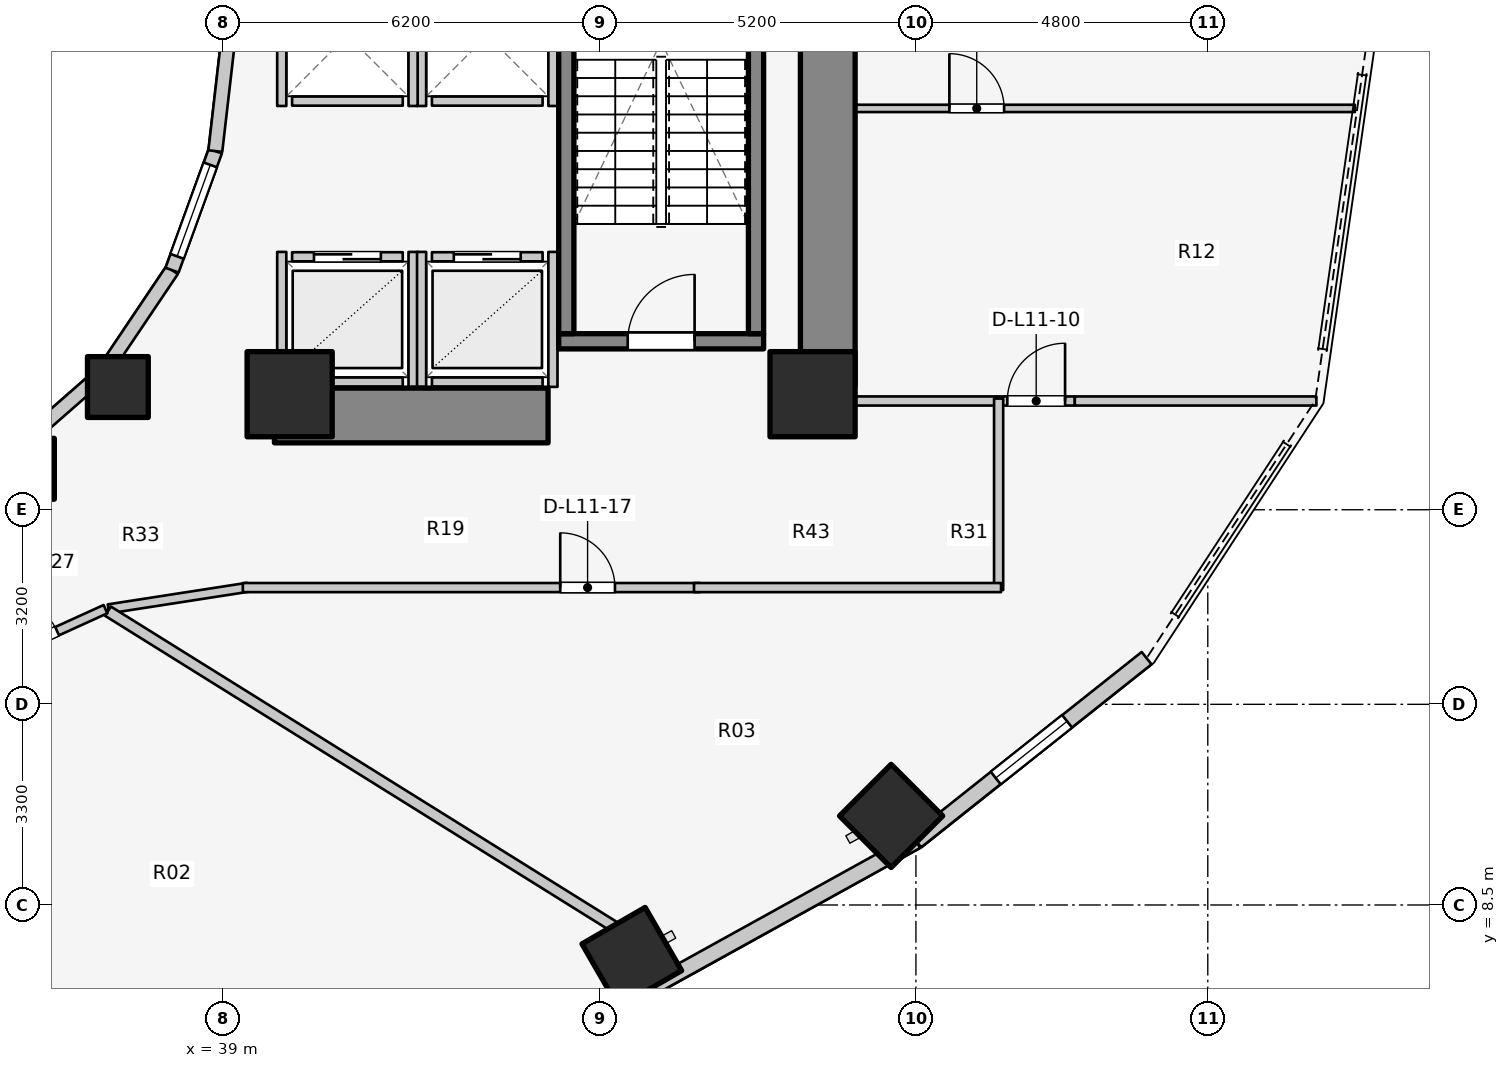
"""IFC4 building model, lengths in metres.
Left out: names, types, materials, properties, quantities, classifications, styles, units other than length and angle.
Written with IfcOpenShell. Run it as: python <this file> out.ifc"""

import sys

from ifc_helpers import new_model, si_unit, direction, frame, frame_2d, origin, origin_2d, place, context, subcontext, project, spatial, rectangle, extrude, element, fill, save


model = new_model("IFC4")
c1 = context("Model", 3, precision=1e-05, world=origin(), true_north=direction((0.0, 1.0)))
c2 = subcontext(c1, "Body", "Model", "MODEL_VIEW")
j1 = project(units=[si_unit("LENGTHUNIT", "METRE"), si_unit("PLANEANGLEUNIT", "RADIAN")], contexts=[c1])
p1 = place(None, origin())
s1 = spatial("IfcSite", under=j1, at=p1, CompositionType="ELEMENT")
p2 = place(p1, origin())
s2 = spatial("IfcBuilding", under=s1, at=p2, CompositionType="ELEMENT")
p3 = place(p2, frame((0.0, 0.0, 40.0)))
s3 = spatial("IfcBuildingStorey", under=s2, at=p3, CompositionType="ELEMENT", Elevation=40.0)
p4 = place(p3, frame((48.95, 17.05, 0.0), z_axis=(0.0, 0.0, 1.0), x_axis=(0.0, 1.0, 0.0)))
e1 = element("IfcWall", 1, at=p4, inside=s3, PredefinedType="SHEAR", context=c2, shape_type="SweptSolid", body=[
    extrude(rectangle(XDim=12.8, YDim=0.9, at=frame_2d((6.4, 0.0))), origin(), (0.0, 0.0, 1.0), 3.1),
])
p5 = place(p3, frame((39.85, 16.55, 0.0), z_axis=(0.0, 0.0, 1.0), x_axis=(1.0, 0.0, 0.0)))
e2 = element("IfcWall", 2, at=p5, inside=s3, PredefinedType="SHEAR", context=c2, shape_type="SweptSolid", body=[
    extrude(rectangle(XDim=4.5, YDim=0.9, at=frame_2d((2.25, 0.0))), origin(), (0.0, 0.0, 1.0), 3.1),
])
p6 = place(p3, frame((44.525, 17.77, 0.0), z_axis=(0.0, 0.0, 1.0), x_axis=(1.0, 0.0, 0.0)))
e3 = element("IfcWall", 3, at=p6, inside=s3, PredefinedType="SOLIDWALL", context=c2, shape_type="SweptSolid", body=[
    extrude(rectangle(XDim=3.37, YDim=0.25, at=frame_2d((1.685, 0.0))), origin(), (0.0, 0.0, 1.0), 3.1),
])
p7 = place(p6, frame((1.135, 0.0, 0.0)))
e4 = element("IfcOpeningElement", 4, at=p7, cuts=e3, PredefinedType="OPENING", context=c2, shape_type="SweptSolid", body=[
    extrude(rectangle(XDim=1.1, YDim=2.1, at=frame_2d((0.55, 1.05))), frame((0.0, 0.135, 0.0), z_axis=(0.0, -1.0, 0.0), x_axis=(1.0, 0.0, 0.0)), (0.0, 0.0, 1.0), 0.27),
])
for number, where, z_axis, x_axis in (
    (5, (44.65, 17.895, 0.0), (0.0, 0.0, 1.0), (0.0, 1.0, 0.0)),
    (6, (47.77, 17.895, 0.0), (0.0, 0.0, 1.0), (0.0, 1.0, 0.0)),
):
    element("IfcWall", number, at=place(p3, frame(where, z_axis=z_axis, x_axis=x_axis)), inside=s3, PredefinedType="SOLIDWALL", context=c2, shape_type="SweptSolid", body=[
        extrude(rectangle(XDim=7.81, YDim=0.25, at=frame_2d((3.905, 0.0))), origin(), (0.0, 0.0, 1.0), 3.1),
    ])
for number, where, z_axis, x_axis in (
    (7, (40.1, 16.9, 0.0), (0.0, 0.0, 1.0), (1.0, 0.0, 0.0)),
    (8, (48.7, 16.9, 0.0), (0.0, 0.0, 1.0), (1.0, 0.0, 0.0)),
):
    element("IfcColumn", number, at=place(p3, frame(where, z_axis=z_axis, x_axis=x_axis)), inside=s3, PredefinedType="COLUMN", context=c2, shape_type="SweptSolid", body=[
        extrude(rectangle(XDim=1.4, YDim=1.4, at=origin_2d()), origin(), (0.0, 0.0, 1.0), 3.1),
    ])
p8 = place(p3, frame((35.73, 15.673, 0.0), z_axis=(0.0, 0.0, 1.0), x_axis=(1.0, 0.0, 0.0)))
e9 = element("IfcColumn", 9, at=p8, inside=s3, PredefinedType="COLUMN", context=c2, shape_type="SweptSolid", body=[
    extrude(rectangle(XDim=1.0, YDim=1.0, at=origin_2d()), origin(), (0.0, 0.0, 1.0), 3.1),
])
p9 = place(p3, frame((45.727, 7.641, 0.0), z_axis=(0.0, 0.0, 1.0), x_axis=(0.5, -0.866025403784, 0.0)))
e10 = element("IfcColumn", 10, at=p9, inside=s3, PredefinedType="COLUMN", context=c2, shape_type="SweptSolid", body=[
    extrude(rectangle(XDim=1.2, YDim=1.2, at=origin_2d()), origin(), (0.0, 0.0, 1.0), 3.1),
])
p10 = place(p3, frame((37.275, 17.018, 0.0), z_axis=(0.0, 0.0, 1.0), x_axis=(1.0, 0.0, 0.0)))
e11 = element("IfcColumn", 11, at=p10, inside=s3, PredefinedType="COLUMN", context=c2, shape_type="SweptSolid", body=[
    extrude(rectangle(XDim=1.0, YDim=1.0, at=origin_2d()), origin(), (0.0, 0.0, 1.0), 3.1),
])
p11 = place(p3, frame((49.992, 9.965, 0.0), z_axis=(0.0, 0.0, 1.0), x_axis=(0.707106781187, -0.707106781187, 0.0)))
e12 = element("IfcColumn", 12, at=p11, inside=s3, PredefinedType="COLUMN", context=c2, shape_type="SweptSolid", body=[
    extrude(rectangle(XDim=1.2, YDim=1.2, at=origin_2d()), origin(), (0.0, 0.0, 1.0), 3.1),
])
p12 = place(p3, frame((35.56, 15.968, 0.0), z_axis=(0.0, 0.0, 1.0), x_axis=(0.752576694707, 0.658504607869, 0.0)))
e13 = element("IfcWall", 13, at=p12, inside=s3, PredefinedType="STANDARD", context=c2, shape_type="SweptSolid", body=[
    extrude(rectangle(XDim=1.959, YDim=0.23, at=frame_2d((0.98, 0.0))), origin(), (0.0, 0.0, 1.0), 2.16),
])
p13 = place(p3, frame((37.035, 17.258, 0.0), z_axis=(0.0, 0.0, 1.0), x_axis=(0.558197800898, 0.829707909492, 0.0)))
e14 = element("IfcWall", 14, at=p13, inside=s3, PredefinedType="STANDARD", context=c2, shape_type="SweptSolid", body=[
    extrude(rectangle(XDim=2.027, YDim=0.23, at=frame_2d((1.013, 0.0))), origin(), (0.0, 0.0, 1.0), 2.16),
])
p14 = place(p3, frame((38.166, 18.94, 0.0), z_axis=(0.0, 0.0, 1.0), x_axis=(0.341423187295, 0.93990968033, 0.0)))
e15 = element("IfcWall", 15, at=p14, inside=s3, PredefinedType="STANDARD", context=c2, shape_type="SweptSolid", body=[
    extrude(rectangle(XDim=2.084, YDim=0.23, at=frame_2d((1.042, 0.0))), origin(), (0.0, 0.0, 1.0), 2.84),
])
p15 = place(p14, frame((0.242, 0.0, 0.85)))
e16 = element("IfcOpeningElement", 16, at=p15, cuts=e15, PredefinedType="OPENING", context=c2, shape_type="SweptSolid", body=[
    extrude(rectangle(XDim=1.6, YDim=1.65, at=frame_2d((0.8, 0.825))), frame((0.0, 0.125, 0.0), z_axis=(0.0, -1.0, 0.0), x_axis=(1.0, 0.0, 0.0)), (0.0, 0.0, 1.0), 0.25),
])
p16 = place(p3, frame((38.877, 20.898, 0.0), z_axis=(0.0, 0.0, 1.0), x_axis=(0.114711713601, 0.993398823617, 0.0)))
e17 = element("IfcWall", 17, at=p16, inside=s3, PredefinedType="STANDARD", context=c2, shape_type="SweptSolid", body=[
    extrude(rectangle(XDim=2.115, YDim=0.23, at=frame_2d((1.058, 0.0))), origin(), (0.0, 0.0, 1.0), 2.84),
])
p17 = place(p3, frame((40.332, 5.447, 0.0), z_axis=(0.0, 0.0, 1.0), x_axis=(0.958843593522, 0.283934786811, 0.0)))
e18 = element("IfcWall", 18, at=p17, inside=s3, PredefinedType="STANDARD", context=c2, shape_type="SweptSolid", body=[
    extrude(rectangle(XDim=5.955, YDim=0.26, at=frame_2d((2.978, 0.0))), origin(), (0.0, 0.0, 1.0), 2.85),
])
p18 = place(p17, frame((1.778, 0.0, 0.75)))
e19 = element("IfcOpeningElement", 19, at=p18, cuts=e18, PredefinedType="OPENING", context=c2, shape_type="SweptSolid", body=[
    extrude(rectangle(XDim=2.4, YDim=1.7, at=frame_2d((1.2, 0.85))), frame((0.0, 0.14, 0.0), z_axis=(0.0, -1.0, 0.0), x_axis=(1.0, 0.0, 0.0)), (0.0, 0.0, 1.0), 0.28),
])
p19 = place(p3, frame((46.042, 7.138, 0.0), z_axis=(0.0, 0.0, 1.0), x_axis=(0.875137303239, 0.483874674352, 0.0)))
e20 = element("IfcWall", 20, at=p19, inside=s3, PredefinedType="STANDARD", context=c2, shape_type="SweptSolid", body=[
    extrude(rectangle(XDim=4.985, YDim=0.26, at=frame_2d((2.493, 0.0))), origin(), (0.0, 0.0, 1.0), 2.85),
])
p20 = place(p3, frame((50.405, 9.55, 0.0), z_axis=(0.0, 0.0, 1.0), x_axis=(0.783123133379, 0.621866672179, 0.0)))
e21 = element("IfcWall", 21, at=p20, inside=s3, PredefinedType="STANDARD", context=c2, shape_type="SweptSolid", body=[
    extrude(rectangle(XDim=4.839, YDim=0.26, at=frame_2d((2.419, 0.0))), origin(), (0.0, 0.0, 1.0), 2.85),
])
p21 = place(p20, frame((1.669, 0.0, 0.75)))
e22 = element("IfcOpeningElement", 22, at=p21, cuts=e21, PredefinedType="OPENING", context=c2, shape_type="SweptSolid", body=[
    extrude(rectangle(XDim=1.5, YDim=1.6, at=frame_2d((0.75, 0.8))), frame((0.0, 0.14, 0.0), z_axis=(0.0, -1.0, 0.0), x_axis=(1.0, 0.0, 0.0)), (0.0, 0.0, 1.0), 0.28),
])
p22 = place(p3, frame((40.14, 19.16, 0.0), z_axis=(0.0, 0.0, 1.0), x_axis=(1.0, 0.0, 0.0)))
e23 = element("IfcWall", 23, at=p22, inside=s3, PredefinedType="SOLIDWALL", context=c2, shape_type="SweptSolid", body=[
    extrude(rectangle(XDim=1.82, YDim=0.15, at=frame_2d((0.91, 0.0))), origin(), (0.0, 0.0, 1.0), 2.12),
])
p23 = place(p22, frame((0.36, 0.0, 0.0)))
e24 = element("IfcOpeningElement", 24, at=p23, cuts=e23, PredefinedType="OPENING", context=c2, shape_type="SweptSolid", body=[
    extrude(rectangle(XDim=1.1, YDim=2.1, at=frame_2d((0.55, 1.05))), frame((0.0, 0.085, 0.0), z_axis=(0.0, -1.0, 0.0), x_axis=(1.0, 0.0, 0.0)), (0.0, 0.0, 1.0), 0.17),
])
p24 = place(p3, frame((40.14, 17.1, 0.0), z_axis=(0.0, 0.0, 1.0), x_axis=(1.0, 0.0, 0.0)))
e25 = element("IfcWall", 25, at=p24, inside=s3, PredefinedType="SOLIDWALL", context=c2, shape_type="SweptSolid", body=[
    extrude(rectangle(XDim=1.82, YDim=0.15, at=frame_2d((0.91, 0.0))), origin(), (0.0, 0.0, 1.0), 2.12),
])
p25 = place(p3, frame((39.97, 17.02, 0.0), z_axis=(0.0, 0.0, 1.0), x_axis=(0.0, 1.0, 0.0)))
e26 = element("IfcWall", 26, at=p25, inside=s3, PredefinedType="SOLIDWALL", context=c2, shape_type="SweptSolid", body=[
    extrude(rectangle(XDim=2.22, YDim=0.15, at=frame_2d((1.11, 0.0))), origin(), (0.0, 0.0, 1.0), 2.12),
])
p26 = place(p3, frame((42.13, 17.02, 0.0), z_axis=(0.0, 0.0, 1.0), x_axis=(0.0, 1.0, 0.0)))
e27 = element("IfcWall", 27, at=p26, inside=s3, PredefinedType="SOLIDWALL", context=c2, shape_type="SweptSolid", body=[
    extrude(rectangle(XDim=2.22, YDim=0.15, at=frame_2d((1.11, 0.0))), origin(), (0.0, 0.0, 1.0), 2.855),
])
p27 = place(p3, frame((42.44, 19.16, 0.0), z_axis=(0.0, 0.0, 1.0), x_axis=(1.0, 0.0, 0.0)))
e28 = element("IfcWall", 28, at=p27, inside=s3, PredefinedType="SOLIDWALL", context=c2, shape_type="SweptSolid", body=[
    extrude(rectangle(XDim=1.82, YDim=0.15, at=frame_2d((0.91, 0.0))), origin(), (0.0, 0.0, 1.0), 2.855),
])
p28 = place(p27, frame((0.36, 0.0, 0.0)))
e29 = element("IfcOpeningElement", 29, at=p28, cuts=e28, PredefinedType="OPENING", context=c2, shape_type="SweptSolid", body=[
    extrude(rectangle(XDim=1.1, YDim=2.1, at=frame_2d((0.55, 1.05))), frame((0.0, 0.085, 0.0), z_axis=(0.0, -1.0, 0.0), x_axis=(1.0, 0.0, 0.0)), (0.0, 0.0, 1.0), 0.17),
])
p29 = place(p3, frame((42.44, 17.1, 0.0), z_axis=(0.0, 0.0, 1.0), x_axis=(1.0, 0.0, 0.0)))
e30 = element("IfcWall", 30, at=p29, inside=s3, PredefinedType="SOLIDWALL", context=c2, shape_type="SweptSolid", body=[
    extrude(rectangle(XDim=1.82, YDim=0.15, at=frame_2d((0.91, 0.0))), origin(), (0.0, 0.0, 1.0), 2.855),
])
p30 = place(p3, frame((42.27, 17.02, 0.0), z_axis=(0.0, 0.0, 1.0), x_axis=(0.0, 1.0, 0.0)))
e31 = element("IfcWall", 31, at=p30, inside=s3, PredefinedType="SOLIDWALL", context=c2, shape_type="SweptSolid", body=[
    extrude(rectangle(XDim=2.22, YDim=0.15, at=frame_2d((1.11, 0.0))), origin(), (0.0, 0.0, 1.0), 2.855),
])
p31 = place(p3, frame((44.43, 17.02, 0.0), z_axis=(0.0, 0.0, 1.0), x_axis=(0.0, 1.0, 0.0)))
e32 = element("IfcWall", 32, at=p31, inside=s3, PredefinedType="SOLIDWALL", context=c2, shape_type="SweptSolid", body=[
    extrude(rectangle(XDim=2.22, YDim=0.15, at=frame_2d((1.11, 0.0))), origin(), (0.0, 0.0, 1.0), 2.12),
])
p32 = place(p3, frame((42.44, 21.72, 0.0), z_axis=(0.0, 0.0, 1.0), x_axis=(1.0, 0.0, 0.0)))
e33 = element("IfcWall", 33, at=p32, inside=s3, PredefinedType="SOLIDWALL", context=c2, shape_type="SweptSolid", body=[
    extrude(rectangle(XDim=1.82, YDim=0.15, at=frame_2d((0.91, 0.0))), origin(), (0.0, 0.0, 1.0), 2.855),
])
for number, where, z_axis, x_axis in (
    (34, (42.27, 21.64, 0.0), (0.0, 0.0, 1.0), (0.0, 1.0, 0.0)),
    (35, (44.43, 21.64, 0.0), (0.0, 0.0, 1.0), (0.0, 1.0, 0.0)),
):
    element("IfcWall", number, at=place(p3, frame(where, z_axis=z_axis, x_axis=x_axis)), inside=s3, PredefinedType="SOLIDWALL", context=c2, shape_type="SweptSolid", body=[
        extrude(rectangle(XDim=2.32, YDim=0.15, at=frame_2d((1.16, 0.0))), origin(), (0.0, 0.0, 1.0), 2.855),
    ])
p33 = place(p3, frame((40.14, 21.72, 0.0), z_axis=(0.0, 0.0, 1.0), x_axis=(1.0, 0.0, 0.0)))
e36 = element("IfcWall", 36, at=p33, inside=s3, PredefinedType="SOLIDWALL", context=c2, shape_type="SweptSolid", body=[
    extrude(rectangle(XDim=1.82, YDim=0.15, at=frame_2d((0.91, 0.0))), origin(), (0.0, 0.0, 1.0), 2.12),
])
p34 = place(p3, frame((39.97, 21.64, 0.0), z_axis=(0.0, 0.0, 1.0), x_axis=(0.0, 1.0, 0.0)))
e37 = element("IfcWall", 37, at=p34, inside=s3, PredefinedType="SOLIDWALL", context=c2, shape_type="SweptSolid", body=[
    extrude(rectangle(XDim=2.32, YDim=0.15, at=frame_2d((1.16, 0.0))), origin(), (0.0, 0.0, 1.0), 2.12),
])
p35 = place(p3, frame((42.13, 21.64, 0.0), z_axis=(0.0, 0.0, 1.0), x_axis=(0.0, 1.0, 0.0)))
e38 = element("IfcWall", 38, at=p35, inside=s3, PredefinedType="SOLIDWALL", context=c2, shape_type="SweptSolid", body=[
    extrude(rectangle(XDim=2.32, YDim=0.15, at=frame_2d((1.16, 0.0))), origin(), (0.0, 0.0, 1.0), 2.855),
])
p36 = place(p3, frame((48.95, 16.788, 0.0), z_axis=(0.0, 0.0, 1.0), x_axis=(1.0, 0.0, 0.0)))
e39 = element("IfcWall", 39, at=p36, inside=s3, PredefinedType="PARTITIONING", context=c2, shape_type="SweptSolid", body=[
    extrude(rectangle(XDim=2.793, YDim=0.15, at=frame_2d((1.396, 0.0))), origin(), (0.0, 0.0, 1.0), 2.069),
])
p37 = place(p3, frame((51.743, 16.788, 0.0), z_axis=(0.0, 0.0, 1.0), x_axis=(1.0, 0.0, 0.0)))
e40 = element("IfcWall", 40, at=p37, inside=s3, PredefinedType="PARTITIONING", context=c2, shape_type="SweptSolid", body=[
    extrude(rectangle(XDim=1.27, YDim=0.15, at=frame_2d((0.635, 0.0))), origin(), (0.0, 0.0, 1.0), 2.855),
])
p38 = place(p37, frame((0.16, 0.0, 0.0)))
e41 = element("IfcOpeningElement", 41, at=p38, cuts=e40, PredefinedType="OPENING", context=c2, shape_type="SweptSolid", body=[
    extrude(rectangle(XDim=0.95, YDim=2.1, at=frame_2d((0.475, 1.05))), frame((0.0, 0.085, 0.0), z_axis=(0.0, -1.0, 0.0), x_axis=(1.0, 0.0, 0.0)), (0.0, 0.0, 1.0), 0.17),
])
p39 = place(p3, frame((53.013, 16.788, 0.0), z_axis=(0.0, 0.0, 1.0), x_axis=(1.0, 0.0, 0.0)))
e42 = element("IfcWall", 42, at=p39, inside=s3, PredefinedType="PARTITIONING", context=c2, shape_type="SweptSolid", body=[
    extrude(rectangle(XDim=3.973, YDim=0.15, at=frame_2d((1.987, 0.0))), origin(), (0.0, 0.0, 1.0), 2.855),
])
p40 = place(p3, frame((48.95, 21.6, 0.0), z_axis=(0.0, 0.0, 1.0), x_axis=(1.0, 0.0, 0.0)))
e43 = element("IfcWall", 43, at=p40, inside=s3, PredefinedType="MOVABLE", context=c2, shape_type="SweptSolid", body=[
    extrude(rectangle(XDim=8.669, YDim=0.12, at=frame_2d((4.334, 0.0))), origin(), (0.0, 0.0, 1.0), 2.855),
])
p41 = place(p40, frame((2.0, 0.0, 0.0)))
e44 = element("IfcOpeningElement", 44, at=p41, cuts=e43, PredefinedType="OPENING", context=c2, shape_type="SweptSolid", body=[
    extrude(rectangle(XDim=0.9, YDim=2.1, at=frame_2d((0.45, 1.05))), frame((0.0, 0.07, 0.0), z_axis=(0.0, -1.0, 0.0), x_axis=(1.0, 0.0, 0.0)), (0.0, 0.0, 1.0), 0.14),
])
p42 = place(p3, frame((51.76, 13.68, 0.0), z_axis=(0.0, 0.0, 1.0), x_axis=(0.0, 1.0, 0.0)))
e45 = element("IfcWall", 45, at=p42, inside=s3, PredefinedType="PARTITIONING", context=c2, shape_type="SweptSolid", body=[
    extrude(rectangle(XDim=3.148, YDim=0.15, at=frame_2d((1.574, 0.0))), origin(), (0.0, 0.0, 1.0), 2.855),
])
p43 = place(p3, frame((37.119, 13.369, 0.0), z_axis=(0.0, 0.0, 1.0), x_axis=(0.988184633586, 0.153268163508, 0.0)))
e46 = element("IfcWall", 46, at=p43, inside=s3, PredefinedType="PARTITIONING", context=c2, shape_type="SweptSolid", body=[
    extrude(rectangle(XDim=2.318, YDim=0.15, at=frame_2d((1.159, 0.0))), origin(), (0.0, 0.0, 1.0), 2.237),
])
p44 = place(p3, frame((39.33, 13.72, 0.0), z_axis=(0.0, 0.0, 1.0), x_axis=(1.0, 0.0, 0.0)))
e47 = element("IfcWall", 47, at=p44, inside=s3, PredefinedType="PARTITIONING", context=c2, shape_type="SweptSolid", body=[
    extrude(rectangle(XDim=7.52, YDim=0.15, at=frame_2d((3.76, 0.0))), origin(), (0.0, 0.0, 1.0), 2.237),
])
p45 = place(p44, frame((5.22, 0.0, 0.0)))
e48 = element("IfcOpeningElement", 48, at=p45, cuts=e47, PredefinedType="OPENING", context=c2, shape_type="SweptSolid", body=[
    extrude(rectangle(XDim=0.9, YDim=2.1, at=frame_2d((0.45, 1.05))), frame((0.0, 0.085, 0.0), z_axis=(0.0, -1.0, 0.0), x_axis=(1.0, 0.0, 0.0)), (0.0, 0.0, 1.0), 0.17),
])
p46 = place(p3, frame((46.75, 13.72, 0.0), z_axis=(0.0, 0.0, 1.0), x_axis=(1.0, 0.0, 0.0)))
e49 = element("IfcWall", 49, at=p46, inside=s3, PredefinedType="PARTITIONING", context=c2, shape_type="SweptSolid", body=[
    extrude(rectangle(XDim=5.05, YDim=0.15, at=frame_2d((2.525, 0.0))), origin(), (0.0, 0.0, 1.0), 2.069),
])
p47 = place(p3, frame((37.112, 13.332, 0.0), z_axis=(0.0, 0.0, 1.0), x_axis=(0.848647785721, -0.52895834977, 0.0)))
e50 = element("IfcWall", 50, at=p47, inside=s3, PredefinedType="PARTITIONING", context=c2, shape_type="SweptSolid", body=[
    extrude(rectangle(XDim=9.81, YDim=0.18, at=frame_2d((4.905, 0.0))), origin(), (0.0, 0.0, 1.0), 2.237),
])
p48 = place(p3, frame((34.615, 12.247, 0.0), z_axis=(0.0, 0.0, 1.0), x_axis=(0.910186679378, 0.414198272186, 0.0)))
e51 = element("IfcWall", 51, at=p48, inside=s3, PredefinedType="PARTITIONING", context=c2, shape_type="SweptSolid", body=[
    extrude(rectangle(XDim=2.698, YDim=0.15, at=frame_2d((1.349, 0.0))), origin(), (0.0, 0.0, 1.0), 2.237),
])
p49 = place(p48, frame((0.874, 0.0, 0.0)))
e52 = element("IfcOpeningElement", 52, at=p49, cuts=e51, PredefinedType="OPENING", context=c2, shape_type="SweptSolid", body=[
    extrude(rectangle(XDim=0.95, YDim=2.1, at=frame_2d((0.475, 1.05))), frame((0.0, 0.085, 0.0), z_axis=(0.0, -1.0, 0.0), x_axis=(1.0, 0.0, 0.0)), (0.0, 0.0, 1.0), 0.17),
])
p50 = place(p15, origin())
e53 = element("IfcWindow", 53, at=p50, inside=s3, PartitioningType="SINGLE_PANEL", PredefinedType="WINDOW", context=c2, shape_type="SweptSolid", body=[
    extrude(rectangle(XDim=1.6, YDim=1.65, at=frame_2d((0.8, 0.825))), frame((0.0, 0.03, 0.0), z_axis=(0.0, -1.0, 0.0), x_axis=(1.0, 0.0, 0.0)), (0.0, 0.0, 1.0), 0.06),
])
fill(e16, e53)
p51 = place(p21, origin())
e54 = element("IfcWindow", 54, at=p51, inside=s3, PartitioningType="SINGLE_PANEL", PredefinedType="WINDOW", context=c2, shape_type="SweptSolid", body=[
    extrude(rectangle(XDim=1.5, YDim=1.6, at=frame_2d((0.75, 0.8))), frame((0.0, 0.03, 0.0), z_axis=(0.0, -1.0, 0.0), x_axis=(1.0, 0.0, 0.0)), (0.0, 0.0, 1.0), 0.06),
])
fill(e22, e54)
p52 = place(p7, origin())
e55 = element("IfcDoor", 55, at=p52, inside=s3, OperationType="SINGLE_SWING_RIGHT", PredefinedType="DOOR", context=c2, shape_type="SweptSolid", body=[
    extrude(rectangle(XDim=1.1, YDim=2.1, at=frame_2d((0.55, 1.05))), frame((0.0, 0.025, 0.0), z_axis=(0.0, -1.0, 0.0), x_axis=(1.0, 0.0, 0.0)), (0.0, 0.0, 1.0), 0.05),
])
fill(e4, e55)
p53 = place(p23, origin())
e56 = element("IfcDoor", 56, at=p53, inside=s3, OperationType="DOUBLE_DOOR_SLIDING", PredefinedType="DOOR", context=c2, shape_type="SweptSolid", body=[
    extrude(rectangle(XDim=1.1, YDim=2.1, at=frame_2d((0.55, 1.05))), frame((0.0, 0.025, 0.0), z_axis=(0.0, -1.0, 0.0), x_axis=(1.0, 0.0, 0.0)), (0.0, 0.0, 1.0), 0.05),
])
fill(e24, e56)
p54 = place(p28, origin())
e57 = element("IfcDoor", 57, at=p54, inside=s3, OperationType="DOUBLE_DOOR_SLIDING", PredefinedType="DOOR", context=c2, shape_type="SweptSolid", body=[
    extrude(rectangle(XDim=1.1, YDim=2.1, at=frame_2d((0.55, 1.05))), frame((0.0, 0.025, 0.0), z_axis=(0.0, -1.0, 0.0), x_axis=(1.0, 0.0, 0.0)), (0.0, 0.0, 1.0), 0.05),
])
fill(e29, e57)
p55 = place(p38, origin())
e58 = element("IfcDoor", 58, at=p55, inside=s3, OperationType="SINGLE_SWING_RIGHT", PredefinedType="DOOR", context=c2, shape_type="SweptSolid", body=[
    extrude(rectangle(XDim=0.95, YDim=2.1, at=frame_2d((0.475, 1.05))), frame((0.0, 0.025, 0.0), z_axis=(0.0, -1.0, 0.0), x_axis=(1.0, 0.0, 0.0)), (0.0, 0.0, 1.0), 0.05),
])
fill(e41, e58)
p56 = place(p41, origin())
e59 = element("IfcDoor", 59, at=p56, inside=s3, OperationType="SINGLE_SWING_LEFT", PredefinedType="DOOR", context=c2, shape_type="SweptSolid", body=[
    extrude(rectangle(XDim=0.9, YDim=2.1, at=frame_2d((0.45, 1.05))), frame((0.0, 0.025, 0.0), z_axis=(0.0, -1.0, 0.0), x_axis=(1.0, 0.0, 0.0)), (0.0, 0.0, 1.0), 0.05),
])
fill(e44, e59)
p57 = place(p45, origin())
e60 = element("IfcDoor", 60, at=p57, inside=s3, OperationType="SINGLE_SWING_LEFT", PredefinedType="DOOR", context=c2, shape_type="SweptSolid", body=[
    extrude(rectangle(XDim=0.9, YDim=2.1, at=frame_2d((0.45, 1.05))), frame((0.0, 0.025, 0.0), z_axis=(0.0, -1.0, 0.0), x_axis=(1.0, 0.0, 0.0)), (0.0, 0.0, 1.0), 0.05),
])
fill(e48, e60)
p58 = place(p49, origin())
e61 = element("IfcDoor", 61, at=p58, inside=s3, OperationType="SINGLE_SWING_LEFT", PredefinedType="DOOR", context=c2, shape_type="SweptSolid", body=[
    extrude(rectangle(XDim=0.95, YDim=2.1, at=frame_2d((0.475, 1.05))), frame((0.0, 0.025, 0.0), z_axis=(0.0, -1.0, 0.0), x_axis=(1.0, 0.0, 0.0)), (0.0, 0.0, 1.0), 0.05),
])
fill(e52, e61)
save(model, sys.argv[1])
